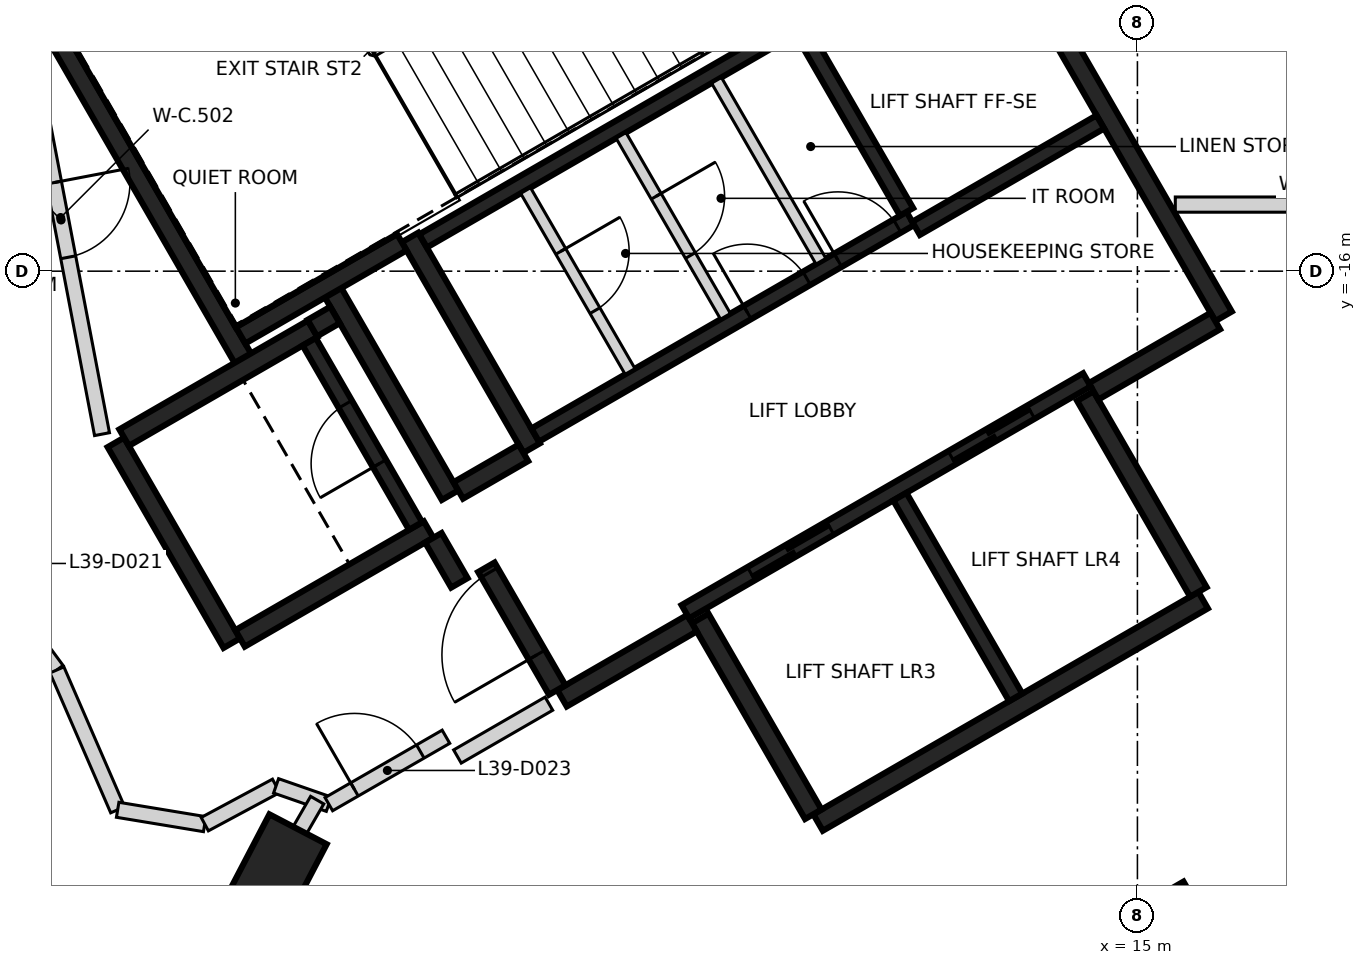
"""IFC4 building model, lengths in metres.
Left out: names, types, materials, properties, quantities, classifications, styles, units other than length and angle.
Written with IfcOpenShell. Run it as: python <this file> out.ifc"""

import sys

from ifc_helpers import new_model, si_unit, direction, frame, frame_2d, origin, origin_2d, place, context, subcontext, project, spatial, rectangle, extrude, element, fill, save


model = new_model("IFC4")
c1 = context("Model", 3, precision=1e-05, world=origin(), true_north=direction((0.0, 1.0)))
c2 = subcontext(c1, "Body", "Model", "MODEL_VIEW")
j1 = project(units=[si_unit("LENGTHUNIT", "METRE"), si_unit("PLANEANGLEUNIT", "RADIAN")], contexts=[c1])
p1 = place(None, origin())
s1 = spatial("IfcSite", under=j1, at=p1, CompositionType="ELEMENT")
p2 = place(p1, origin())
s2 = spatial("IfcBuilding", under=s1, at=p2, CompositionType="ELEMENT")
p3 = place(p2, frame((0.0, 0.0, 157.6)))
s3 = spatial("IfcBuildingStorey", under=s2, at=p3, CompositionType="ELEMENT", Elevation=157.6)
p4 = place(p3, frame((3.667, -23.896, -0.4), z_axis=(0.0, 0.0, 1.0), x_axis=(0.463006774365, 0.886354740999, 0.0)))
e1 = element("IfcColumn", 1, at=p4, inside=s3, PredefinedType="COLUMN", context=c2, shape_type="SweptSolid", body=[
    extrude(rectangle(XDim=1.25, YDim=0.85, at=origin_2d()), origin(), (0.0, 0.0, 1.0), 3.6),
])
p5 = place(p3, frame((15.207, -26.34, -0.4), z_axis=(0.0, 0.0, 1.0), x_axis=(-0.5, 0.866025403784, 0.0)))
e2 = element("IfcColumn", 2, at=p5, inside=s3, PredefinedType="COLUMN", context=c2, shape_type="SweptSolid", body=[
    extrude(rectangle(XDim=3.6, YDim=3.0, at=origin_2d()), origin(), (0.0, 0.0, 1.0), 3.6),
])
p6 = place(p3, frame((13.008, -11.181, 0.0), z_axis=(0.0, 0.0, 1.0), x_axis=(0.500004234368, -0.866022959057, 0.0)))
e3 = element("IfcWall", 3, at=p6, inside=s3, PredefinedType="SHEAR", context=c2, shape_type="SweptSolid", body=[
    extrude(rectangle(XDim=6.25, YDim=0.25, at=frame_2d((3.125, 0.0))), origin(), (0.0, 0.0, 1.0), 3.2),
])
p7 = place(p3, frame((15.865, -20.328, 0.0), z_axis=(0.0, 0.0, 1.0), x_axis=(-0.86602852612, -0.499994591916, 0.0)))
e4 = element("IfcWall", 4, at=p7, inside=s3, PredefinedType="SHEAR", context=c2, shape_type="SweptSolid", body=[
    extrude(rectangle(XDim=5.85, YDim=0.25, at=frame_2d((2.925, 0.0))), origin(), (0.0, 0.0, 1.0), 3.2),
])
p8 = place(p3, frame((3.235, -17.153, 0.0), z_axis=(0.0, 0.0, 1.0), x_axis=(-0.500008851346, 0.866020293397, 0.0)))
e5 = element("IfcWall", 5, at=p8, inside=s3, PredefinedType="SHEAR", context=c2, shape_type="SweptSolid", body=[
    extrude(rectangle(XDim=5.51, YDim=0.25, at=frame_2d((2.755, 0.0))), origin(), (0.0, 0.0, 1.0), 3.2),
])
p9 = place(p3, frame((7.031, -18.327, 0.0), z_axis=(0.0, 0.0, 1.0), x_axis=(-0.499971222258, 0.866042017984, 0.0)))
e6 = element("IfcWall", 6, at=p9, inside=s3, PredefinedType="SHEAR", context=c2, shape_type="SweptSolid", body=[
    extrude(rectangle(XDim=3.2, YDim=0.25, at=frame_2d((1.6, 0.0))), origin(), (0.0, 0.0, 1.0), 3.2),
])
for number, where, z_axis, x_axis in (
    (7, (14.315, -17.644, 0.0), (0.0, 0.0, 1.0), (0.5, -0.866, 0.0)),
    (8, (10.736, -23.145, 0.0), (0.0, 0.0, 1.0), (-0.5, 0.866, 0.0)),
):
    element("IfcWall", number, at=place(p3, frame(where, z_axis=z_axis, x_axis=x_axis)), inside=s3, PredefinedType="SHEAR", context=c2, shape_type="SweptSolid", body=[
        extrude(rectangle(XDim=2.974, YDim=0.25, at=frame_2d((1.487, 0.0))), origin(), (0.0, 0.0, 1.0), 3.2),
    ])
p10 = place(p3, frame((3.085, -20.894, 0.0), z_axis=(0.0, 0.0, 1.0), x_axis=(-0.499978833458, 0.866037623948, 0.0)))
e9 = element("IfcWall", 9, at=p10, inside=s3, PredefinedType="SHEAR", context=c2, shape_type="SweptSolid", body=[
    extrude(rectangle(XDim=3.05, YDim=0.25, at=frame_2d((1.525, 0.0))), origin(), (0.0, 0.0, 1.0), 3.2),
])
p11 = place(p3, frame((1.669, -18.19, 0.0), z_axis=(0.0, 0.0, 1.0), x_axis=(0.866042235819, 0.499970844928, 0.0)))
e10 = element("IfcWall", 10, at=p11, inside=s3, PredefinedType="SHEAR", context=c2, shape_type="SweptSolid", body=[
    extrude(rectangle(XDim=2.865, YDim=0.25, at=frame_2d((1.432, 0.0))), origin(), (0.0, 0.0, 1.0), 3.2),
])
p12 = place(p3, frame((5.675, -19.399, 0.0), z_axis=(0.0, 0.0, 1.0), x_axis=(-0.866026637627, -0.499997862916, 0.0)))
e11 = element("IfcWall", 11, at=p12, inside=s3, PredefinedType="SHEAR", context=c2, shape_type="SweptSolid", body=[
    extrude(rectangle(XDim=2.865, YDim=0.25, at=frame_2d((1.432, 0.0))), origin(), (0.0, 0.0, 1.0), 3.2),
])
p13 = place(p3, frame((4.414, -16.276, 0.0), z_axis=(0.0, 0.0, 1.0), x_axis=(0.500003324108, -0.866023484601, 0.0)))
e12 = element("IfcWall", 12, at=p13, inside=s3, PredefinedType="SHEAR", context=c2, shape_type="SweptSolid", body=[
    extrude(rectangle(XDim=3.085, YDim=0.25, at=frame_2d((1.542, 0.0))), origin(), (0.0, 0.0, 1.0), 3.2),
])
p14 = place(p3, frame((5.322, -15.619, 0.0), z_axis=(0.0, 0.0, 1.0), x_axis=(-0.866026229868, -0.499998569178, 0.0)))
e13 = element("IfcWall", 13, at=p14, inside=s3, PredefinedType="SHEAR", context=c2, shape_type="SweptSolid", body=[
    extrude(rectangle(XDim=2.449, YDim=0.25, at=frame_2d((1.225, 0.0))), origin(), (0.0, 0.0, 1.0), 3.2),
])
p15 = place(p3, frame((9.14, -20.631, 0.0), z_axis=(0.0, 0.0, 1.0), x_axis=(-0.866043531843, -0.499968599967, 0.0)))
e14 = element("IfcWall", 14, at=p15, inside=s3, PredefinedType="SHEAR", context=c2, shape_type="SweptSolid", body=[
    extrude(rectangle(XDim=1.975, YDim=0.25, at=frame_2d((0.987, 0.0))), origin(), (0.0, 0.0, 1.0), 3.2),
])
p16 = place(p3, frame((16.025, -16.656, 0.0), z_axis=(0.0, 0.0, 1.0), x_axis=(-0.866016279763, -0.500015802937, 0.0)))
e15 = element("IfcWall", 15, at=p16, inside=s3, PredefinedType="SHEAR", context=c2, shape_type="SweptSolid", body=[
    extrude(rectangle(XDim=1.849, YDim=0.25, at=frame_2d((0.925, 0.0))), origin(), (0.0, 0.0, 1.0), 3.2),
])
p17 = place(p3, frame((7.367, -21.51, 0.0), z_axis=(0.0, 0.0, 1.0), x_axis=(-0.499983108224, 0.866035156036, 0.0)))
e16 = element("IfcWall", 16, at=p17, inside=s3, PredefinedType="SHEAR", context=c2, shape_type="SweptSolid", body=[
    extrude(rectangle(XDim=1.865, YDim=0.25, at=frame_2d((0.932, 0.0))), origin(), (0.0, 0.0, 1.0), 3.2),
])
p18 = place(p17, frame((0.535, 0.0, 0.0)))
e17 = element("IfcOpeningElement", 17, at=p18, cuts=e16, PredefinedType="OPENING", context=c2, shape_type="SweptSolid", body=[
    extrude(rectangle(XDim=1.25, YDim=2.1, at=frame_2d((0.625, 1.05))), frame((0.0, 0.135, 0.0), z_axis=(0.0, -1.0, 0.0), x_axis=(1.0, 0.0, 0.0)), (0.0, 0.0, 1.0), 0.27),
])
p19 = place(p3, frame((6.065, -18.885, 0.0), z_axis=(0.0, 0.0, 1.0), x_axis=(0.866017078145, 0.500014420154, 0.0)))
e18 = element("IfcWall", 18, at=p19, inside=s3, PredefinedType="SHEAR", context=c2, shape_type="SweptSolid", body=[
    extrude(rectangle(XDim=0.989, YDim=0.25, at=frame_2d((0.495, 0.0))), origin(), (0.0, 0.0, 1.0), 3.2),
])
p20 = place(p3, frame((6.08, -20.1, 0.0), z_axis=(0.0, 0.0, 1.0), x_axis=(-0.500051773299, 0.865995510393, 0.0)))
e19 = element("IfcWall", 19, at=p20, inside=s3, PredefinedType="SHEAR", context=c2, shape_type="SweptSolid", body=[
    extrude(rectangle(XDim=0.685, YDim=0.25, at=frame_2d((0.342, 0.0))), origin(), (0.0, 0.0, 1.0), 3.2),
])
p21 = place(p3, frame((4.145, -16.749, 0.0), z_axis=(0.0, 0.0, 1.0), x_axis=(0.866185586049, 0.49972245349, 0.0)))
e20 = element("IfcWall", 20, at=p21, inside=s3, PredefinedType="SHEAR", context=c2, shape_type="SweptSolid", body=[
    extrude(rectangle(XDim=0.344, YDim=0.25, at=frame_2d((0.172, 0.0))), origin(), (0.0, 0.0, 1.0), 3.2),
])
p22 = place(p3, frame((9.052, -20.48, 0.0), z_axis=(0.0, 0.0, 1.0), x_axis=(0.866030299012, 0.499991521122, 0.0)))
e21 = element("IfcWall", 21, at=p22, inside=s3, PredefinedType="SHEAR", context=c2, shape_type="SweptSolid", body=[
    extrude(rectangle(XDim=6.1, YDim=0.2, at=frame_2d((3.05, 0.0))), origin(), (0.0, 0.0, 1.0), 3.2),
])
p23 = place(p22, frame((1.0, 0.0, 0.0)))
e22 = element("IfcOpeningElement", 22, at=p23, cuts=e21, PredefinedType="OPENING", context=c2, shape_type="SweptSolid", body=[
    extrude(rectangle(XDim=1.2, YDim=2.1, at=frame_2d((0.6, 1.05))), frame((0.0, 0.11, 0.0), z_axis=(0.0, -1.0, 0.0), x_axis=(1.0, 0.0, 0.0)), (0.0, 0.0, 1.0), 0.22),
])
p24 = place(p22, frame((4.05, 0.0, 0.0)))
e23 = element("IfcOpeningElement", 23, at=p24, cuts=e21, PredefinedType="OPENING", context=c2, shape_type="SweptSolid", body=[
    extrude(rectangle(XDim=1.2, YDim=2.1, at=frame_2d((0.6, 1.05))), frame((0.0, 0.11, 0.0), z_axis=(0.0, -1.0, 0.0), x_axis=(1.0, 0.0, 0.0)), (0.0, 0.0, 1.0), 0.22),
])
p25 = place(p3, frame((10.538, -12.752, 0.0), z_axis=(0.0, 0.0, 1.0), x_axis=(-0.866038630372, -0.499977090179, 0.0)))
e24 = element("IfcWall", 24, at=p25, inside=s3, PredefinedType="SHEAR", context=c2, shape_type="SweptSolid", body=[
    extrude(rectangle(XDim=5.699, YDim=0.2, at=frame_2d((2.85, 0.0))), origin(), (0.0, 0.0, 1.0), 3.2),
])
p26 = place(p3, frame((7.077, -18.156, 0.0), z_axis=(0.0, 0.0, 1.0), x_axis=(0.866038630372, 0.499977090179, 0.0)))
e25 = element("IfcWall", 25, at=p26, inside=s3, PredefinedType="SHEAR", context=c2, shape_type="SweptSolid", body=[
    extrude(rectangle(XDim=5.699, YDim=0.2, at=frame_2d((2.85, 0.0))), origin(), (0.0, 0.0, 1.0), 3.2),
])
p27 = place(p26, frame((3.224, 0.0, 0.0)))
e26 = element("IfcOpeningElement", 26, at=p27, cuts=e25, PredefinedType="OPENING", context=c2, shape_type="SweptSolid", body=[
    extrude(rectangle(XDim=0.9, YDim=2.1, at=frame_2d((0.45, 1.05))), frame((0.0, 0.11, 0.0), z_axis=(0.0, -1.0, 0.0), x_axis=(1.0, 0.0, 0.0)), (0.0, 0.0, 1.0), 0.22),
])
p28 = place(p26, frame((4.599, 0.0, 0.0)))
e27 = element("IfcOpeningElement", 27, at=p28, cuts=e25, PredefinedType="OPENING", context=c2, shape_type="SweptSolid", body=[
    extrude(rectangle(XDim=0.9, YDim=2.1, at=frame_2d((0.45, 1.05))), frame((0.0, 0.11, 0.0), z_axis=(0.0, -1.0, 0.0), x_axis=(1.0, 0.0, 0.0)), (0.0, 0.0, 1.0), 0.22),
])
p29 = place(p3, frame((11.875, -18.967, 0.0), z_axis=(0.0, 0.0, 1.0), x_axis=(0.49998131003, -0.866036194175, 0.0)))
e28 = element("IfcWall", 28, at=p29, inside=s3, PredefinedType="SHEAR", context=c2, shape_type="SweptSolid", body=[
    extrude(rectangle(XDim=3.048, YDim=0.2, at=frame_2d((1.524, 0.0))), origin(), (0.0, 0.0, 1.0), 3.2),
])
p30 = place(p3, frame((5.503, -19.352, 0.0), z_axis=(0.0, 0.0, 1.0), x_axis=(-0.499986818241, 0.866033014143, 0.0)))
e29 = element("IfcWall", 29, at=p30, inside=s3, PredefinedType="SHEAR", context=c2, shape_type="SweptSolid", body=[
    extrude(rectangle(XDim=2.798, YDim=0.2, at=frame_2d((1.399, 0.0))), origin(), (0.0, 0.0, 1.0), 3.2),
])
p31 = place(p30, frame((0.949, 0.0, 0.0)))
e30 = element("IfcOpeningElement", 30, at=p31, cuts=e29, PredefinedType="OPENING", context=c2, shape_type="SweptSolid", body=[
    extrude(rectangle(XDim=0.9, YDim=2.1, at=frame_2d((0.45, 1.05))), frame((0.0, 0.11, 0.0), z_axis=(0.0, -1.0, 0.0), x_axis=(1.0, 0.0, 0.0)), (0.0, 0.0, 1.0), 0.22),
])
p32 = place(p3, frame((11.963, -15.22, 0.0), z_axis=(0.0, 0.0, 1.0), x_axis=(-0.500034990121, 0.866005201286, 0.0)))
e31 = element("IfcWall", 31, at=p32, inside=s3, PredefinedType="SHEAR", context=c2, shape_type="SweptSolid", body=[
    extrude(rectangle(XDim=2.75, YDim=0.2, at=frame_2d((1.375, 0.0))), origin(), (0.0, 0.0, 1.0), 3.2),
])
p33 = place(p3, frame((14.512, -14.037, 0.0), z_axis=(0.0, 0.0, 1.0), x_axis=(-0.866044696403, -0.499966582715, 0.0)))
e32 = element("IfcWall", 32, at=p33, inside=s3, PredefinedType="SHEAR", context=c2, shape_type="SweptSolid", body=[
    extrude(rectangle(XDim=2.799, YDim=0.2, at=frame_2d((1.399, 0.0))), origin(), (0.0, 0.0, 1.0), 3.2),
])
p34 = place(p3, frame((8.207, -14.214, 0.0), z_axis=(0.0, 0.0, 1.0), x_axis=(0.50002746344, -0.86600954718, 0.0)))
e33 = element("IfcWall", 33, at=p34, inside=s3, PredefinedType="PARTITIONING", context=c2, shape_type="SweptSolid", body=[
    extrude(rectangle(XDim=2.748, YDim=0.15, at=frame_2d((1.374, 0.0))), origin(), (0.0, 0.0, 1.0), 3.2),
])
p35 = place(p34, frame((0.924, 0.0, 0.0)))
e34 = element("IfcOpeningElement", 34, at=p35, cuts=e33, PredefinedType="OPENING", context=c2, shape_type="SweptSolid", body=[
    extrude(rectangle(XDim=0.9, YDim=2.1, at=frame_2d((0.45, 1.05))), frame((0.0, 0.085, 0.0), z_axis=(0.0, -1.0, 0.0), x_axis=(1.0, 0.0, 0.0)), (0.0, 0.0, 1.0), 0.17),
])
p36 = place(p3, frame((9.462, -13.489, 0.0), z_axis=(0.0, 0.0, 1.0), x_axis=(0.499988999718, -0.866031754707, 0.0)))
e35 = element("IfcWall", 35, at=p36, inside=s3, PredefinedType="PARTITIONING", context=c2, shape_type="SweptSolid", body=[
    extrude(rectangle(XDim=2.749, YDim=0.15, at=frame_2d((1.374, 0.0))), origin(), (0.0, 0.0, 1.0), 3.2),
])
p37 = place(p3, frame((6.951, -14.939, 0.0), z_axis=(0.0, 0.0, 1.0), x_axis=(0.499988999718, -0.866031754707, 0.0)))
e36 = element("IfcWall", 36, at=p37, inside=s3, PredefinedType="PARTITIONING", context=c2, shape_type="SweptSolid", body=[
    extrude(rectangle(XDim=2.749, YDim=0.15, at=frame_2d((1.374, 0.0))), origin(), (0.0, 0.0, 1.0), 3.2),
])
p38 = place(p37, frame((0.924, 0.0, 0.0)))
e37 = element("IfcOpeningElement", 37, at=p38, cuts=e36, PredefinedType="OPENING", context=c2, shape_type="SweptSolid", body=[
    extrude(rectangle(XDim=0.9, YDim=2.1, at=frame_2d((0.45, 1.05))), frame((0.0, 0.085, 0.0), z_axis=(0.0, -1.0, 0.0), x_axis=(1.0, 0.0, 0.0)), (0.0, 0.0, 1.0), 0.17),
])
p39 = place(p3, frame((-0.858, -19.016, 0.0), z_axis=(0.0, 0.0, 1.0), x_axis=(0.593123867414, -0.805111220829, 0.0)))
e38 = element("IfcWall", 38, at=p39, inside=s3, PredefinedType="PARTITIONING", context=c2, shape_type="SweptSolid", body=[
    extrude(rectangle(XDim=2.77, YDim=0.2, at=frame_2d((1.385, 0.0))), origin(), (0.0, 0.0, 1.0), 3.2),
])
p40 = place(p39, frame((0.555, 0.0, 0.0)))
e39 = element("IfcOpeningElement", 39, at=p40, cuts=e38, PredefinedType="OPENING", context=c2, shape_type="SweptSolid", body=[
    extrude(rectangle(XDim=0.95, YDim=2.1, at=frame_2d((0.475, 1.05))), frame((0.0, 0.11, 0.0), z_axis=(0.0, -1.0, 0.0), x_axis=(1.0, 0.0, 0.0)), (0.0, 0.0, 1.0), 0.22),
])
p41 = place(p3, frame((0.289, -12.445, 0.0), z_axis=(0.0, 0.0, 1.0), x_axis=(0.187668946952, -0.982232338273, 0.0)))
e40 = element("IfcWall", 40, at=p41, inside=s3, PredefinedType="PARTITIONING", context=c2, shape_type="SweptSolid", body=[
    extrude(rectangle(XDim=5.802, YDim=0.2, at=frame_2d((2.901, 0.0))), origin(), (0.0, 0.0, 1.0), 3.2),
])
p42 = place(p41, frame((2.433, 0.0, 0.0)))
e41 = element("IfcOpeningElement", 41, at=p42, cuts=e40, PredefinedType="OPENING", context=c2, shape_type="SweptSolid", body=[
    extrude(rectangle(XDim=1.0, YDim=2.1, at=frame_2d((0.5, 1.05))), frame((0.0, 0.11, 0.0), z_axis=(0.0, -1.0, 0.0), x_axis=(1.0, 0.0, 0.0)), (0.0, 0.0, 1.0), 0.22),
])
p43 = place(p3, frame((0.785, -21.246, 0.0), z_axis=(0.0, 0.0, 1.0), x_axis=(0.398365586627, -0.917226721913, 0.0)))
e42 = element("IfcWall", 42, at=p43, inside=s3, PredefinedType="PARTITIONING", context=c2, shape_type="SweptSolid", body=[
    extrude(rectangle(XDim=2.006, YDim=0.2, at=frame_2d((1.003, 0.0))), origin(), (0.0, 0.0, 1.0), 2.3),
])
p44 = place(p3, frame((1.584, -23.086, 0.0), z_axis=(0.0, 0.0, 1.0), x_axis=(0.986654221629, -0.162829502674, 0.0)))
e43 = element("IfcWall", 43, at=p44, inside=s3, PredefinedType="PARTITIONING", context=c2, shape_type="SweptSolid", body=[
    extrude(rectangle(XDim=1.16, YDim=0.2, at=frame_2d((0.58, 0.0))), origin(), (0.0, 0.0, 1.0), 2.3),
])
p45 = place(p3, frame((2.73, -23.275, 0.0), z_axis=(0.0, 0.0, 1.0), x_axis=(0.880927165636, 0.473251866182, 0.0)))
e44 = element("IfcWall", 44, at=p45, inside=s3, PredefinedType="PARTITIONING", context=c2, shape_type="SweptSolid", body=[
    extrude(rectangle(XDim=1.065, YDim=0.2, at=frame_2d((0.532, 0.0))), origin(), (0.0, 0.0, 1.0), 3.2),
])
p46 = place(p3, frame((3.668, -22.771, 0.0), z_axis=(0.0, 0.0, 1.0), x_axis=(0.944447470761, -0.328662402738, 0.0)))
e45 = element("IfcWall", 45, at=p46, inside=s3, PredefinedType="PARTITIONING", context=c2, shape_type="SweptSolid", body=[
    extrude(rectangle(XDim=0.735, YDim=0.2, at=frame_2d((0.367, 0.0))), origin(), (0.0, 0.0, 1.0), 3.2),
])
p47 = place(p3, frame((4.362, -23.012, 0.0), z_axis=(0.0, 0.0, 1.0), x_axis=(0.866692617793, 0.49884256661, 0.0)))
e46 = element("IfcWall", 46, at=p47, inside=s3, PredefinedType="PARTITIONING", context=c2, shape_type="SweptSolid", body=[
    extrude(rectangle(XDim=1.778, YDim=0.2, at=frame_2d((0.889, 0.0))), origin(), (0.0, 0.0, 1.0), 3.2),
])
p48 = place(p47, frame((0.389, 0.0, 0.0)))
e47 = element("IfcOpeningElement", 47, at=p48, cuts=e46, PredefinedType="OPENING", context=c2, shape_type="SweptSolid", body=[
    extrude(rectangle(XDim=1.0, YDim=2.1, at=frame_2d((0.5, 1.05))), frame((0.0, 0.11, 0.0), z_axis=(0.0, -1.0, 0.0), x_axis=(1.0, 0.0, 0.0)), (0.0, 0.0, 1.0), 0.22),
])
p49 = place(p3, frame((6.054, -22.385, 0.0), z_axis=(0.0, 0.0, 1.0), x_axis=(0.86593101922, 0.500163443238, 0.0)))
e48 = element("IfcWall", 48, at=p49, inside=s3, PredefinedType="PARTITIONING", context=c2, shape_type="SweptSolid", body=[
    extrude(rectangle(XDim=1.39, YDim=0.2, at=frame_2d((0.695, 0.0))), origin(), (0.0, 0.0, 1.0), 3.2),
])
p50 = place(p3, frame((2.845, -25.321, 0.0), z_axis=(0.0, 0.0, 1.0), x_axis=(0.499942002849, 0.866058885866, 0.0)))
e49 = element("IfcWall", 49, at=p50, inside=s3, PredefinedType="PARTITIONING", context=c2, shape_type="SweptSolid", body=[
    extrude(rectangle(XDim=2.727, YDim=0.2, at=frame_2d((1.364, 0.0))), origin(), (0.0, 0.0, 1.0), 3.2),
])
p51 = place(p3, frame((15.498, -15.124, 0.0), z_axis=(0.0, 0.0, 1.0), x_axis=(1.0, 0.0, 0.0)))
e50 = element("IfcWall", 50, at=p51, inside=s3, PredefinedType="PARTITIONING", context=c2, shape_type="SweptSolid", body=[
    extrude(rectangle(XDim=5.008, YDim=0.2, at=frame_2d((2.504, 0.0))), origin(), (0.0, 0.0, 1.0), 3.2),
])
p52 = place(p23, origin())
e51 = element("IfcDoor", 51, at=p52, inside=s3, OperationType="DOUBLE_DOOR_SLIDING", PredefinedType="DOOR", context=c2, shape_type="SweptSolid", body=[
    extrude(rectangle(XDim=1.2, YDim=2.1, at=frame_2d((0.6, 1.05))), frame((0.0, 0.025, 0.0), z_axis=(0.0, -1.0, 0.0), x_axis=(1.0, 0.0, 0.0)), (0.0, 0.0, 1.0), 0.05),
])
fill(e22, e51)
p53 = place(p24, origin())
e52 = element("IfcDoor", 52, at=p53, inside=s3, OperationType="DOUBLE_DOOR_SLIDING", PredefinedType="DOOR", context=c2, shape_type="SweptSolid", body=[
    extrude(rectangle(XDim=1.2, YDim=2.1, at=frame_2d((0.6, 1.05))), frame((0.0, 0.025, 0.0), z_axis=(0.0, -1.0, 0.0), x_axis=(1.0, 0.0, 0.0)), (0.0, 0.0, 1.0), 0.05),
])
fill(e23, e52)
p54 = place(p18, origin())
e53 = element("IfcDoor", 53, at=p54, inside=s3, OperationType="SINGLE_SWING_LEFT", PredefinedType="DOOR", context=c2, shape_type="SweptSolid", body=[
    extrude(rectangle(XDim=1.25, YDim=2.1, at=frame_2d((0.625, 1.05))), frame((0.0, 0.025, 0.0), z_axis=(0.0, -1.0, 0.0), x_axis=(1.0, 0.0, 0.0)), (0.0, 0.0, 1.0), 0.05),
])
fill(e17, e53)
p55 = place(p27, origin())
e54 = element("IfcDoor", 54, at=p55, inside=s3, OperationType="SINGLE_SWING_LEFT", PredefinedType="DOOR", context=c2, shape_type="SweptSolid", body=[
    extrude(rectangle(XDim=0.9, YDim=2.1, at=frame_2d((0.45, 1.05))), frame((0.0, 0.025, 0.0), z_axis=(0.0, -1.0, 0.0), x_axis=(1.0, 0.0, 0.0)), (0.0, 0.0, 1.0), 0.05),
])
fill(e26, e54)
p56 = place(p28, origin())
e55 = element("IfcDoor", 55, at=p56, inside=s3, OperationType="SINGLE_SWING_RIGHT", PredefinedType="DOOR", context=c2, shape_type="SweptSolid", body=[
    extrude(rectangle(XDim=0.9, YDim=2.1, at=frame_2d((0.45, 1.05))), frame((0.0, 0.025, 0.0), z_axis=(0.0, -1.0, 0.0), x_axis=(1.0, 0.0, 0.0)), (0.0, 0.0, 1.0), 0.05),
])
fill(e27, e55)
p57 = place(p31, origin())
e56 = element("IfcDoor", 56, at=p57, inside=s3, OperationType="SINGLE_SWING_LEFT", PredefinedType="DOOR", context=c2, shape_type="SweptSolid", body=[
    extrude(rectangle(XDim=0.9, YDim=2.1, at=frame_2d((0.45, 1.05))), frame((0.0, 0.025, 0.0), z_axis=(0.0, -1.0, 0.0), x_axis=(1.0, 0.0, 0.0)), (0.0, 0.0, 1.0), 0.05),
])
fill(e30, e56)
p58 = place(p35, origin())
e57 = element("IfcDoor", 57, at=p58, inside=s3, OperationType="SINGLE_SWING_RIGHT", PredefinedType="DOOR", context=c2, shape_type="SweptSolid", body=[
    extrude(rectangle(XDim=0.9, YDim=2.1, at=frame_2d((0.45, 1.05))), frame((0.0, 0.025, 0.0), z_axis=(0.0, -1.0, 0.0), x_axis=(1.0, 0.0, 0.0)), (0.0, 0.0, 1.0), 0.05),
])
fill(e34, e57)
p59 = place(p38, origin())
e58 = element("IfcDoor", 58, at=p59, inside=s3, OperationType="SINGLE_SWING_LEFT", PredefinedType="DOOR", context=c2, shape_type="SweptSolid", body=[
    extrude(rectangle(XDim=0.9, YDim=2.1, at=frame_2d((0.45, 1.05))), frame((0.0, 0.025, 0.0), z_axis=(0.0, -1.0, 0.0), x_axis=(1.0, 0.0, 0.0)), (0.0, 0.0, 1.0), 0.05),
])
fill(e37, e58)
p60 = place(p42, origin())
e59 = element("IfcDoor", 59, at=p60, inside=s3, OperationType="SINGLE_SWING_LEFT", PredefinedType="DOOR", context=c2, shape_type="SweptSolid", body=[
    extrude(rectangle(XDim=1.0, YDim=2.1, at=frame_2d((0.5, 1.05))), frame((0.0, 0.025, 0.0), z_axis=(0.0, -1.0, 0.0), x_axis=(1.0, 0.0, 0.0)), (0.0, 0.0, 1.0), 0.05),
])
fill(e41, e59)
p61 = place(p48, frame((1.0, 0.0, 0.0), z_axis=(0.0, 0.0, 1.0), x_axis=(-1.0, 0.0, 0.0)))
e60 = element("IfcDoor", 60, at=p61, inside=s3, OperationType="SINGLE_SWING_LEFT", PredefinedType="DOOR", context=c2, shape_type="SweptSolid", body=[
    extrude(rectangle(XDim=1.0, YDim=2.1, at=frame_2d((0.5, 1.05))), frame((0.0, 0.025, 0.0), z_axis=(0.0, -1.0, 0.0), x_axis=(1.0, 0.0, 0.0)), (0.0, 0.0, 1.0), 0.05),
])
fill(e47, e60)
save(model, sys.argv[1])
